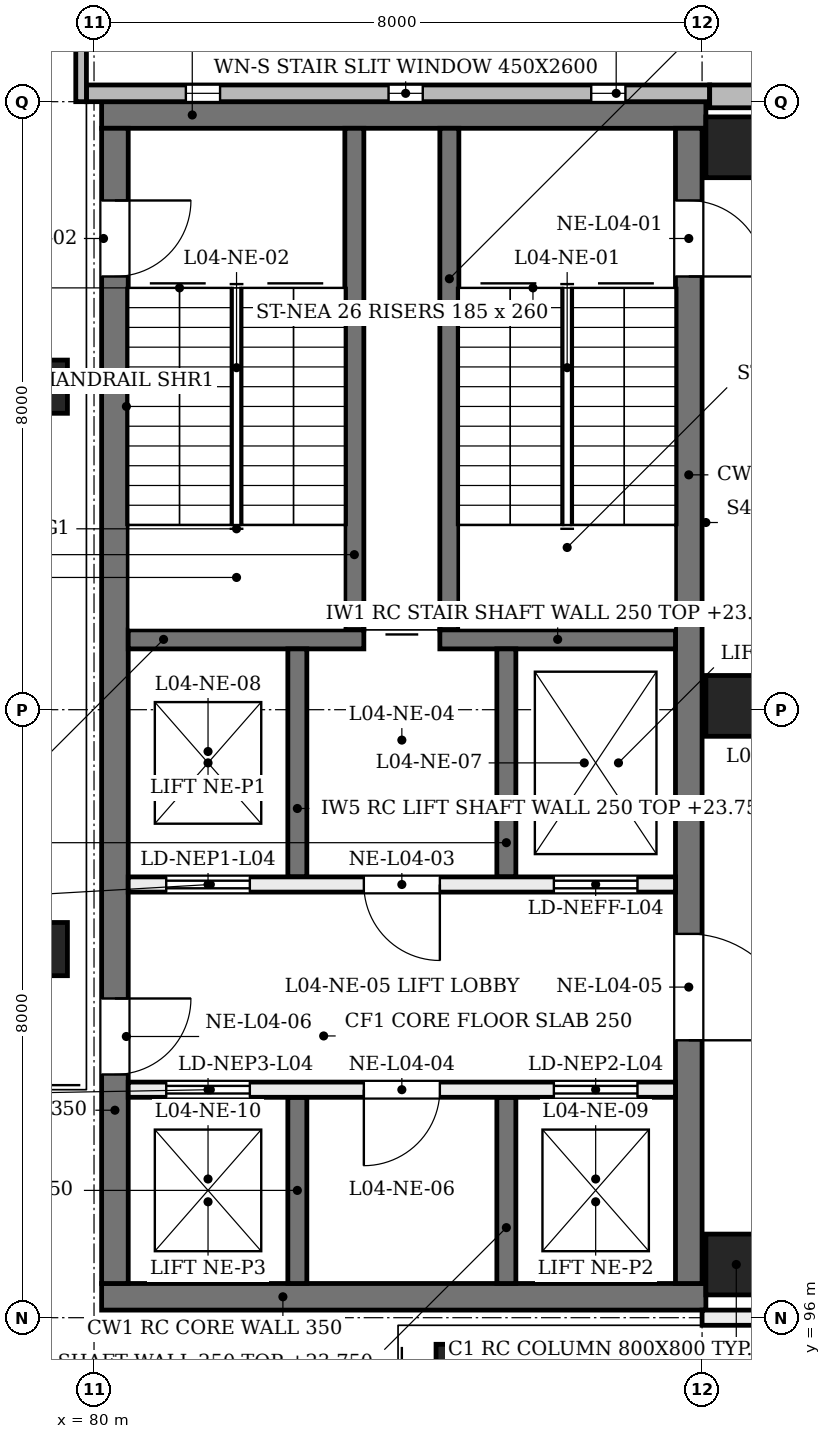
"""IFC4 building model, lengths in metres.
Left out: names, types, materials, properties, quantities, classifications, styles, units other than length and angle.
Written with IfcOpenShell. Run it as: python <this file> out.ifc"""

import sys

from ifc_helpers import new_model, si_unit, direction, frame, frame_2d, origin, origin_2d, place, context, subcontext, project, spatial, rectangle, extrude, element, fill, save


model = new_model("IFC4")
c1 = context("Model", 3, precision=1e-05, world=origin(), true_north=direction((0.0, 1.0)))
c2 = subcontext(c1, "Body", "Model", "MODEL_VIEW")
j1 = project(units=[si_unit("LENGTHUNIT", "METRE"), si_unit("PLANEANGLEUNIT", "RADIAN")], contexts=[c1])
p1 = place(None, origin())
s1 = spatial("IfcSite", under=j1, at=p1, CompositionType="ELEMENT")
p2 = place(p1, origin())
s2 = spatial("IfcBuilding", under=s1, at=p2, CompositionType="ELEMENT")
p3 = place(p2, frame((0.0, 0.0, 19.2)))
s3 = spatial("IfcBuildingStorey", under=s2, at=p3, CompositionType="ELEMENT", Elevation=19.2)
for number, where, z_axis, x_axis in (
    (1, (80.1, 96.275, 0.0), (0.0, 0.0, 1.0), (1.0, 0.0, 0.0)),
    (2, (80.1, 111.825, 0.0), (0.0, 0.0, 1.0), (1.0, 0.0, 0.0)),
):
    element("IfcWall", number, at=place(p3, frame(where, z_axis=z_axis, x_axis=x_axis)), inside=s3, PredefinedType="SHEAR", context=c2, shape_type="SweptSolid", body=[
        extrude(rectangle(XDim=7.95, YDim=0.35, at=frame_2d((3.975, 0.0))), origin(), (0.0, 0.0, 1.0), 4.58),
    ])
p4 = place(p3, frame((80.275, 96.45, 0.0), z_axis=(0.0, 0.0, 1.0), x_axis=(0.0, 1.0, 0.0)))
e3 = element("IfcWall", 3, at=p4, inside=s3, PredefinedType="SHEAR", context=c2, shape_type="SweptSolid", body=[
    extrude(rectangle(XDim=15.2, YDim=0.35, at=frame_2d((7.6, 0.0))), origin(), (0.0, 0.0, 1.0), 4.58),
])
p5 = place(p4, frame((13.25, 0.0, 0.0)))
e4 = element("IfcOpeningElement", 4, at=p5, cuts=e3, PredefinedType="OPENING", context=c2, shape_type="SweptSolid", body=[
    extrude(rectangle(XDim=1.0, YDim=2.1, at=frame_2d((0.5, 1.05))), frame((0.0, 0.185, 0.0), z_axis=(0.0, -1.0, 0.0), x_axis=(1.0, 0.0, 0.0)), (0.0, 0.0, 1.0), 0.37),
])
p6 = place(p4, frame((2.75, 0.0, 0.0)))
e5 = element("IfcOpeningElement", 5, at=p6, cuts=e3, PredefinedType="OPENING", context=c2, shape_type="SweptSolid", body=[
    extrude(rectangle(XDim=1.0, YDim=2.1, at=frame_2d((0.5, 1.05))), frame((0.0, 0.185, 0.0), z_axis=(0.0, -1.0, 0.0), x_axis=(1.0, 0.0, 0.0)), (0.0, 0.0, 1.0), 0.37),
])
p7 = place(p3, frame((87.825, 96.45, 0.0), z_axis=(0.0, 0.0, 1.0), x_axis=(0.0, 1.0, 0.0)))
e6 = element("IfcWall", 6, at=p7, inside=s3, PredefinedType="SHEAR", context=c2, shape_type="SweptSolid", body=[
    extrude(rectangle(XDim=15.2, YDim=0.35, at=frame_2d((7.6, 0.0))), origin(), (0.0, 0.0, 1.0), 4.58),
])
p8 = place(p7, frame((13.25, 0.0, 0.0)))
e7 = element("IfcOpeningElement", 7, at=p8, cuts=e6, PredefinedType="OPENING", context=c2, shape_type="SweptSolid", body=[
    extrude(rectangle(XDim=1.0, YDim=2.1, at=frame_2d((0.5, 1.05))), frame((0.0, 0.185, 0.0), z_axis=(0.0, -1.0, 0.0), x_axis=(1.0, 0.0, 0.0)), (0.0, 0.0, 1.0), 0.37),
])
p9 = place(p7, frame((3.2, 0.0, 0.0)))
e8 = element("IfcOpeningElement", 8, at=p9, cuts=e6, PredefinedType="OPENING", context=c2, shape_type="SweptSolid", body=[
    extrude(rectangle(XDim=1.4, YDim=2.1, at=frame_2d((0.7, 1.05))), frame((0.0, 0.185, 0.0), z_axis=(0.0, -1.0, 0.0), x_axis=(1.0, 0.0, 0.0)), (0.0, 0.0, 1.0), 0.37),
])
for number, where, z_axis, x_axis in (
    (9, (88.45, 96.7, 0.0), (0.0, 0.0, 1.0), (1.0, 0.0, 0.0)),
    (10, (88.45, 104.05, 0.0), (0.0, 0.0, 1.0), (1.0, 0.0, 0.0)),
    (11, (88.45, 111.4, 0.0), (0.0, 0.0, 1.0), (1.0, 0.0, 0.0)),
):
    element("IfcColumn", number, at=place(p3, frame(where, z_axis=z_axis, x_axis=x_axis)), inside=s3, PredefinedType="COLUMN", context=c2, shape_type="SweptSolid", body=[
        extrude(rectangle(XDim=0.8, YDim=0.8, at=origin_2d()), origin(), (0.0, 0.0, 1.0), 4.8),
    ])
for number, where, z_axis, x_axis in (
    (12, (79.3, 100.6, 0.0), (0.0, 0.204, 0.979), (-1.0, 0.0, 0.0)),
    (13, (79.3, 108.0, 0.0), (0.0, 0.204, 0.979), (-1.0, 0.0, 0.0)),
    (14, (84.6, 95.3, 0.0), (0.204, 0.0, 0.979), (0.0, 1.0, 0.0)),
):
    element("IfcColumn", number, at=place(p3, frame(where, z_axis=z_axis, x_axis=x_axis)), inside=s3, PredefinedType="COLUMN", context=c2, shape_type="SweptSolid", body=[
        extrude(rectangle(XDim=0.7, YDim=0.7, at=origin_2d()), origin(), (0.0, 0.0, 1.0), 4.678),
    ])
p10 = place(p3, frame((79.9, 112.11, 0.0), z_axis=(0.0, 0.0, 1.0), x_axis=(1.0, 0.0, 0.0)))
e15 = element("IfcWall", 15, at=p10, inside=s3, PredefinedType="SOLIDWALL", context=c2, shape_type="SweptSolid", body=[
    extrude(rectangle(XDim=8.2, YDim=0.22, at=frame_2d((4.1, 0.0))), origin(), (0.0, 0.0, 1.0), 3.9),
])
p11 = place(p10, frame((1.308, 0.0, 0.9)))
e16 = element("IfcOpeningElement", 16, at=p11, cuts=e15, PredefinedType="OPENING", context=c2, shape_type="SweptSolid", body=[
    extrude(rectangle(XDim=0.45, YDim=2.6, at=frame_2d((0.225, 1.3))), frame((0.0, 0.12, 0.0), z_axis=(0.0, -1.0, 0.0), x_axis=(1.0, 0.0, 0.0)), (0.0, 0.0, 1.0), 0.24),
])
p12 = place(p10, frame((3.975, 0.0, 0.9)))
e17 = element("IfcOpeningElement", 17, at=p12, cuts=e15, PredefinedType="OPENING", context=c2, shape_type="SweptSolid", body=[
    extrude(rectangle(XDim=0.45, YDim=2.6, at=frame_2d((0.225, 1.3))), frame((0.0, 0.12, 0.0), z_axis=(0.0, -1.0, 0.0), x_axis=(1.0, 0.0, 0.0)), (0.0, 0.0, 1.0), 0.24),
])
p13 = place(p10, frame((6.642, 0.0, 0.9)))
e18 = element("IfcOpeningElement", 18, at=p13, cuts=e15, PredefinedType="OPENING", context=c2, shape_type="SweptSolid", body=[
    extrude(rectangle(XDim=0.45, YDim=2.6, at=frame_2d((0.225, 1.3))), frame((0.0, 0.12, 0.0), z_axis=(0.0, -1.0, 0.0), x_axis=(1.0, 0.0, 0.0)), (0.0, 0.0, 1.0), 0.24),
])
p14 = place(p3, frame((88.1, 112.07, 0.0), z_axis=(0.0, 0.0, 1.0), x_axis=(1.0, 0.0, 0.0)))
e19 = element("IfcWall", 19, at=p14, inside=s3, PredefinedType="SOLIDWALL", context=c2, shape_type="SweptSolid", body=[
    extrude(rectangle(XDim=7.9, YDim=0.3, at=frame_2d((3.95, 0.0))), origin(), (0.0, 0.0, 1.0), 3.9),
])
p15 = place(p14, frame((0.717, 0.0, 0.75)))
e20 = element("IfcOpeningElement", 20, at=p15, cuts=e19, PredefinedType="OPENING", context=c2, shape_type="SweptSolid", body=[
    extrude(rectangle(XDim=1.2, YDim=3.1, at=frame_2d((0.6, 1.55))), frame((0.0, 0.16, 0.0), z_axis=(0.0, -1.0, 0.0), x_axis=(1.0, 0.0, 0.0)), (0.0, 0.0, 1.0), 0.32),
])
p16 = place(p14, frame((3.35, 0.0, 0.75)))
e21 = element("IfcOpeningElement", 21, at=p16, cuts=e19, PredefinedType="OPENING", context=c2, shape_type="SweptSolid", body=[
    extrude(rectangle(XDim=1.2, YDim=3.1, at=frame_2d((0.6, 1.55))), frame((0.0, 0.16, 0.0), z_axis=(0.0, -1.0, 0.0), x_axis=(1.0, 0.0, 0.0)), (0.0, 0.0, 1.0), 0.32),
])
p17 = place(p14, frame((5.983, 0.0, 0.75)))
e22 = element("IfcOpeningElement", 22, at=p17, cuts=e19, PredefinedType="OPENING", context=c2, shape_type="SweptSolid", body=[
    extrude(rectangle(XDim=1.2, YDim=3.1, at=frame_2d((0.6, 1.55))), frame((0.0, 0.16, 0.0), z_axis=(0.0, -1.0, 0.0), x_axis=(1.0, 0.0, 0.0)), (0.0, 0.0, 1.0), 0.32),
])
p18 = place(p3, frame((79.83, 112.0, 0.0), z_axis=(0.0, 0.0, 1.0), x_axis=(0.0, 1.0, 0.0)))
e23 = element("IfcWall", 23, at=p18, inside=s3, PredefinedType="SOLIDWALL", context=c2, shape_type="SweptSolid", body=[
    extrude(rectangle(XDim=4.0, YDim=0.14, at=frame_2d((2.0, 0.0))), origin(), (0.0, 0.0, 1.0), 3.9),
])
for number, where, z_axis, x_axis in (
    (24, (84.675, 111.65, 0.0), (0.0, 0.0, 1.0), (0.0, -1.0, 0.0)),
    (25, (83.425, 111.65, 0.0), (0.0, 0.0, 1.0), (0.0, -1.0, 0.0)),
):
    element("IfcWall", number, at=place(p3, frame(where, z_axis=z_axis, x_axis=x_axis)), inside=s3, PredefinedType="SOLIDWALL", context=c2, shape_type="SweptSolid", body=[
        extrude(rectangle(XDim=6.6, YDim=0.25, at=frame_2d((3.3, 0.0))), origin(), (0.0, 0.0, 1.0), 4.55),
    ])
p19 = place(p3, frame((87.65, 104.925, 0.0), z_axis=(0.0, 0.0, 1.0), x_axis=(-1.0, 0.0, 0.0)))
e26 = element("IfcWall", 26, at=p19, inside=s3, PredefinedType="SOLIDWALL", context=c2, shape_type="SweptSolid", body=[
    extrude(rectangle(XDim=3.1, YDim=0.25, at=frame_2d((1.55, 0.0))), origin(), (0.0, 0.0, 1.0), 4.55),
])
p20 = place(p3, frame((83.55, 104.925, 0.0), z_axis=(0.0, 0.0, 1.0), x_axis=(-1.0, 0.0, 0.0)))
e27 = element("IfcWall", 27, at=p20, inside=s3, PredefinedType="SOLIDWALL", context=c2, shape_type="SweptSolid", body=[
    extrude(rectangle(XDim=3.1, YDim=0.25, at=frame_2d((1.55, 0.0))), origin(), (0.0, 0.0, 1.0), 4.55),
])
p21 = place(p3, frame((85.425, 104.8, 0.0), z_axis=(0.0, 0.0, 1.0), x_axis=(0.0, -1.0, 0.0)))
e28 = element("IfcWall", 28, at=p21, inside=s3, PredefinedType="SOLIDWALL", context=c2, shape_type="SweptSolid", body=[
    extrude(rectangle(XDim=3.0, YDim=0.25, at=frame_2d((1.5, 0.0))), origin(), (0.0, 0.0, 1.0), 4.55),
])
p22 = place(p3, frame((85.425, 98.9, 0.0), z_axis=(0.0, 0.0, 1.0), x_axis=(0.0, -1.0, 0.0)))
e29 = element("IfcWall", 29, at=p22, inside=s3, PredefinedType="SOLIDWALL", context=c2, shape_type="SweptSolid", body=[
    extrude(rectangle(XDim=2.45, YDim=0.25, at=frame_2d((1.225, 0.0))), origin(), (0.0, 0.0, 1.0), 4.55),
])
p23 = place(p3, frame((82.675, 104.8, 0.0), z_axis=(0.0, 0.0, 1.0), x_axis=(0.0, -1.0, 0.0)))
e30 = element("IfcWall", 30, at=p23, inside=s3, PredefinedType="SOLIDWALL", context=c2, shape_type="SweptSolid", body=[
    extrude(rectangle(XDim=3.0, YDim=0.25, at=frame_2d((1.5, 0.0))), origin(), (0.0, 0.0, 1.0), 4.55),
])
p24 = place(p3, frame((82.675, 98.9, 0.0), z_axis=(0.0, 0.0, 1.0), x_axis=(0.0, -1.0, 0.0)))
e31 = element("IfcWall", 31, at=p24, inside=s3, PredefinedType="SOLIDWALL", context=c2, shape_type="SweptSolid", body=[
    extrude(rectangle(XDim=2.45, YDim=0.25, at=frame_2d((1.225, 0.0))), origin(), (0.0, 0.0, 1.0), 4.55),
])
p25 = place(p3, frame((87.65, 101.7, 0.0), z_axis=(0.0, 0.0, 1.0), x_axis=(-1.0, 0.0, 0.0)))
e32 = element("IfcWall", 32, at=p25, inside=s3, PredefinedType="SOLIDWALL", context=c2, shape_type="SweptSolid", body=[
    extrude(rectangle(XDim=7.2, YDim=0.2, at=frame_2d((3.6, 0.0))), origin(), (0.0, 0.0, 1.0), 4.55),
])
p26 = place(p25, frame((0.5, 0.0, 0.0)))
e33 = element("IfcOpeningElement", 33, at=p26, cuts=e32, PredefinedType="OPENING", context=c2, shape_type="SweptSolid", body=[
    extrude(rectangle(XDim=1.1, YDim=2.1, at=frame_2d((0.55, 1.05))), frame((0.0, 0.11, 0.0), z_axis=(0.0, -1.0, 0.0), x_axis=(1.0, 0.0, 0.0)), (0.0, 0.0, 1.0), 0.22),
])
p27 = place(p25, frame((5.6, 0.0, 0.0)))
e34 = element("IfcOpeningElement", 34, at=p27, cuts=e32, PredefinedType="OPENING", context=c2, shape_type="SweptSolid", body=[
    extrude(rectangle(XDim=1.1, YDim=2.1, at=frame_2d((0.55, 1.05))), frame((0.0, 0.11, 0.0), z_axis=(0.0, -1.0, 0.0), x_axis=(1.0, 0.0, 0.0)), (0.0, 0.0, 1.0), 0.22),
])
p28 = place(p25, frame((3.1, 0.0, 0.0)))
e35 = element("IfcOpeningElement", 35, at=p28, cuts=e32, PredefinedType="OPENING", context=c2, shape_type="SweptSolid", body=[
    extrude(rectangle(XDim=1.0, YDim=2.1, at=frame_2d((0.5, 1.05))), frame((0.0, 0.11, 0.0), z_axis=(0.0, -1.0, 0.0), x_axis=(1.0, 0.0, 0.0)), (0.0, 0.0, 1.0), 0.22),
])
p29 = place(p3, frame((87.65, 99.0, 0.0), z_axis=(0.0, 0.0, 1.0), x_axis=(-1.0, 0.0, 0.0)))
e36 = element("IfcWall", 36, at=p29, inside=s3, PredefinedType="SOLIDWALL", context=c2, shape_type="SweptSolid", body=[
    extrude(rectangle(XDim=7.2, YDim=0.2, at=frame_2d((3.6, 0.0))), origin(), (0.0, 0.0, 1.0), 4.55),
])
p30 = place(p29, frame((0.5, 0.0, 0.0)))
e37 = element("IfcOpeningElement", 37, at=p30, cuts=e36, PredefinedType="OPENING", context=c2, shape_type="SweptSolid", body=[
    extrude(rectangle(XDim=1.1, YDim=2.1, at=frame_2d((0.55, 1.05))), frame((0.0, 0.11, 0.0), z_axis=(0.0, -1.0, 0.0), x_axis=(1.0, 0.0, 0.0)), (0.0, 0.0, 1.0), 0.22),
])
p31 = place(p29, frame((5.6, 0.0, 0.0)))
e38 = element("IfcOpeningElement", 38, at=p31, cuts=e36, PredefinedType="OPENING", context=c2, shape_type="SweptSolid", body=[
    extrude(rectangle(XDim=1.1, YDim=2.1, at=frame_2d((0.55, 1.05))), frame((0.0, 0.11, 0.0), z_axis=(0.0, -1.0, 0.0), x_axis=(1.0, 0.0, 0.0)), (0.0, 0.0, 1.0), 0.22),
])
p32 = place(p29, frame((3.1, 0.0, 0.0)))
e39 = element("IfcOpeningElement", 39, at=p32, cuts=e36, PredefinedType="OPENING", context=c2, shape_type="SweptSolid", body=[
    extrude(rectangle(XDim=1.0, YDim=2.1, at=frame_2d((0.5, 1.05))), frame((0.0, 0.11, 0.0), z_axis=(0.0, -1.0, 0.0), x_axis=(1.0, 0.0, 0.0)), (0.0, 0.0, 1.0), 0.22),
])
p33 = place(p3, frame((88.0, 96.0, 0.0), z_axis=(0.0, 0.0, 1.0), x_axis=(1.0, 0.0, 0.0)))
e40 = element("IfcWall", 40, at=p33, inside=s3, PredefinedType="PARTITIONING", context=c2, shape_type="SweptSolid", body=[
    extrude(rectangle(XDim=3.6, YDim=0.2, at=frame_2d((1.8, 0.0))), origin(), (0.0, 0.0, 1.0), 3.88),
])
p34 = place(p33, frame((1.0, 0.0, 0.0)))
e41 = element("IfcOpeningElement", 41, at=p34, cuts=e40, PredefinedType="OPENING", context=c2, shape_type="SweptSolid", body=[
    extrude(rectangle(XDim=1.6, YDim=2.1, at=frame_2d((0.8, 1.05))), frame((0.0, 0.11, 0.0), z_axis=(0.0, -1.0, 0.0), x_axis=(1.0, 0.0, 0.0)), (0.0, 0.0, 1.0), 0.22),
])
p35 = place(p11, origin())
e42 = element("IfcWindow", 42, at=p35, inside=s3, PartitioningType="SINGLE_PANEL", PredefinedType="WINDOW", context=c2, shape_type="SweptSolid", body=[
    extrude(rectangle(XDim=0.45, YDim=2.6, at=frame_2d((0.225, 1.3))), frame((0.0, 0.03, 0.0), z_axis=(0.0, -1.0, 0.0), x_axis=(1.0, 0.0, 0.0)), (0.0, 0.0, 1.0), 0.06),
])
fill(e16, e42)
p36 = place(p12, origin())
e43 = element("IfcWindow", 43, at=p36, inside=s3, PartitioningType="SINGLE_PANEL", PredefinedType="WINDOW", context=c2, shape_type="SweptSolid", body=[
    extrude(rectangle(XDim=0.45, YDim=2.6, at=frame_2d((0.225, 1.3))), frame((0.0, 0.03, 0.0), z_axis=(0.0, -1.0, 0.0), x_axis=(1.0, 0.0, 0.0)), (0.0, 0.0, 1.0), 0.06),
])
fill(e17, e43)
p37 = place(p13, origin())
e44 = element("IfcWindow", 44, at=p37, inside=s3, PartitioningType="SINGLE_PANEL", PredefinedType="WINDOW", context=c2, shape_type="SweptSolid", body=[
    extrude(rectangle(XDim=0.45, YDim=2.6, at=frame_2d((0.225, 1.3))), frame((0.0, 0.03, 0.0), z_axis=(0.0, -1.0, 0.0), x_axis=(1.0, 0.0, 0.0)), (0.0, 0.0, 1.0), 0.06),
])
fill(e18, e44)
p38 = place(p8, frame((1.0, 0.0, 0.0), z_axis=(0.0, 0.0, 1.0), x_axis=(-1.0, 0.0, 0.0)))
e45 = element("IfcDoor", 45, at=p38, inside=s3, OperationType="SINGLE_SWING_LEFT", PredefinedType="DOOR", context=c2, shape_type="SweptSolid", body=[
    extrude(rectangle(XDim=1.0, YDim=2.1, at=frame_2d((0.5, 1.05))), frame((0.0, 0.025, 0.0), z_axis=(0.0, -1.0, 0.0), x_axis=(1.0, 0.0, 0.0)), (0.0, 0.0, 1.0), 0.05),
])
fill(e7, e45)
p39 = place(p5, origin())
e46 = element("IfcDoor", 46, at=p39, inside=s3, OperationType="SINGLE_SWING_RIGHT", PredefinedType="DOOR", context=c2, shape_type="SweptSolid", body=[
    extrude(rectangle(XDim=1.0, YDim=2.1, at=frame_2d((0.5, 1.05))), frame((0.0, 0.025, 0.0), z_axis=(0.0, -1.0, 0.0), x_axis=(1.0, 0.0, 0.0)), (0.0, 0.0, 1.0), 0.05),
])
fill(e4, e46)
p40 = place(p26, origin())
e47 = element("IfcDoor", 47, at=p40, inside=s3, OperationType="DOUBLE_DOOR_SLIDING", PredefinedType="DOOR", context=c2, shape_type="SweptSolid", body=[
    extrude(rectangle(XDim=1.1, YDim=2.1, at=frame_2d((0.55, 1.05))), frame((0.0, 0.025, 0.0), z_axis=(0.0, -1.0, 0.0), x_axis=(1.0, 0.0, 0.0)), (0.0, 0.0, 1.0), 0.05),
])
fill(e33, e47)
p41 = place(p27, origin())
e48 = element("IfcDoor", 48, at=p41, inside=s3, OperationType="DOUBLE_DOOR_SLIDING", PredefinedType="DOOR", context=c2, shape_type="SweptSolid", body=[
    extrude(rectangle(XDim=1.1, YDim=2.1, at=frame_2d((0.55, 1.05))), frame((0.0, 0.025, 0.0), z_axis=(0.0, -1.0, 0.0), x_axis=(1.0, 0.0, 0.0)), (0.0, 0.0, 1.0), 0.05),
])
fill(e34, e48)
p42 = place(p30, frame((1.1, 0.0, 0.0), z_axis=(0.0, 0.0, 1.0), x_axis=(-1.0, 0.0, 0.0)))
e49 = element("IfcDoor", 49, at=p42, inside=s3, OperationType="DOUBLE_DOOR_SLIDING", PredefinedType="DOOR", context=c2, shape_type="SweptSolid", body=[
    extrude(rectangle(XDim=1.1, YDim=2.1, at=frame_2d((0.55, 1.05))), frame((0.0, 0.025, 0.0), z_axis=(0.0, -1.0, 0.0), x_axis=(1.0, 0.0, 0.0)), (0.0, 0.0, 1.0), 0.05),
])
fill(e37, e49)
p43 = place(p31, frame((1.1, 0.0, 0.0), z_axis=(0.0, 0.0, 1.0), x_axis=(-1.0, 0.0, 0.0)))
e50 = element("IfcDoor", 50, at=p43, inside=s3, OperationType="DOUBLE_DOOR_SLIDING", PredefinedType="DOOR", context=c2, shape_type="SweptSolid", body=[
    extrude(rectangle(XDim=1.1, YDim=2.1, at=frame_2d((0.55, 1.05))), frame((0.0, 0.025, 0.0), z_axis=(0.0, -1.0, 0.0), x_axis=(1.0, 0.0, 0.0)), (0.0, 0.0, 1.0), 0.05),
])
fill(e38, e50)
p44 = place(p28, origin())
e51 = element("IfcDoor", 51, at=p44, inside=s3, OperationType="SINGLE_SWING_LEFT", PredefinedType="DOOR", context=c2, shape_type="SweptSolid", body=[
    extrude(rectangle(XDim=1.0, YDim=2.1, at=frame_2d((0.5, 1.05))), frame((0.0, 0.025, 0.0), z_axis=(0.0, -1.0, 0.0), x_axis=(1.0, 0.0, 0.0)), (0.0, 0.0, 1.0), 0.05),
])
fill(e35, e51)
p45 = place(p32, frame((1.0, 0.0, 0.0), z_axis=(0.0, 0.0, 1.0), x_axis=(-1.0, 0.0, 0.0)))
e52 = element("IfcDoor", 52, at=p45, inside=s3, OperationType="SINGLE_SWING_RIGHT", PredefinedType="DOOR", context=c2, shape_type="SweptSolid", body=[
    extrude(rectangle(XDim=1.0, YDim=2.1, at=frame_2d((0.5, 1.05))), frame((0.0, 0.025, 0.0), z_axis=(0.0, -1.0, 0.0), x_axis=(1.0, 0.0, 0.0)), (0.0, 0.0, 1.0), 0.05),
])
fill(e39, e52)
p46 = place(p9, frame((1.4, 0.0, 0.0), z_axis=(0.0, 0.0, 1.0), x_axis=(-1.0, 0.0, 0.0)))
e53 = element("IfcDoor", 53, at=p46, inside=s3, OperationType="SINGLE_SWING_LEFT", PredefinedType="DOOR", context=c2, shape_type="SweptSolid", body=[
    extrude(rectangle(XDim=1.4, YDim=2.1, at=frame_2d((0.7, 1.05))), frame((0.0, 0.025, 0.0), z_axis=(0.0, -1.0, 0.0), x_axis=(1.0, 0.0, 0.0)), (0.0, 0.0, 1.0), 0.05),
])
fill(e8, e53)
p47 = place(p6, origin())
e54 = element("IfcDoor", 54, at=p47, inside=s3, OperationType="SINGLE_SWING_RIGHT", PredefinedType="DOOR", context=c2, shape_type="SweptSolid", body=[
    extrude(rectangle(XDim=1.0, YDim=2.1, at=frame_2d((0.5, 1.05))), frame((0.0, 0.025, 0.0), z_axis=(0.0, -1.0, 0.0), x_axis=(1.0, 0.0, 0.0)), (0.0, 0.0, 1.0), 0.05),
])
fill(e5, e54)
save(model, sys.argv[1])
